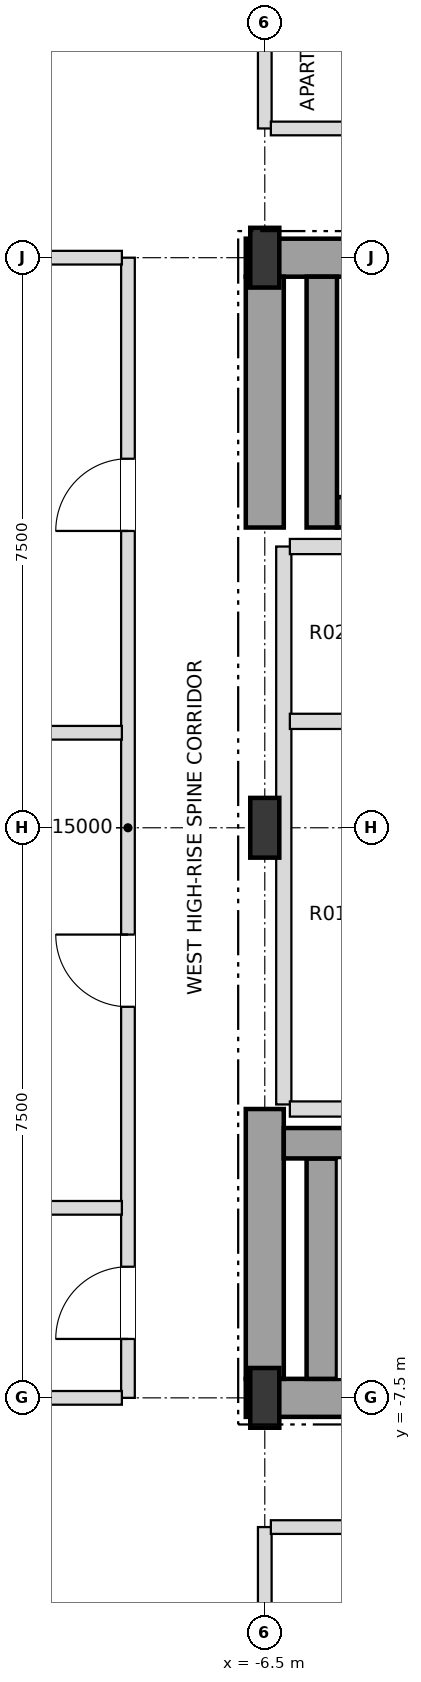
"""IFC4 building model, lengths in metres.
Left out: names, types, materials, properties, quantities, classifications, styles, units other than length and angle.
Written with IfcOpenShell. Run it as: python <this file> out.ifc"""

import sys

from ifc_helpers import new_model, si_unit, direction, frame, frame_2d, origin, origin_2d, place, context, subcontext, project, spatial, rectangle, i_section, extrude, element, fill, save


model = new_model("IFC4")
c1 = context("Model", 3, precision=1e-05, world=origin(), true_north=direction((0.0, 1.0)))
c2 = subcontext(c1, "Body", "Model", "MODEL_VIEW")
j1 = project(units=[si_unit("LENGTHUNIT", "METRE"), si_unit("PLANEANGLEUNIT", "RADIAN")], contexts=[c1])
p1 = place(None, origin())
s1 = spatial("IfcSite", under=j1, at=p1, CompositionType="ELEMENT")
p2 = place(p1, origin())
s2 = spatial("IfcBuilding", under=s1, at=p2, CompositionType="ELEMENT")
p3 = place(p2, frame((0.0, 0.0, 276.3)))
s3 = spatial("IfcBuildingStorey", under=s2, at=p3, CompositionType="ELEMENT", Elevation=276.3)
for number, where, z_axis, x_axis in (
    (1, (-6.5, -7.5, 0.0), (0.0, 0.0, 1.0), (1.0, 0.0, 0.0)),
    (2, (-6.5, 0.0, 0.0), (0.0, 0.0, 1.0), (1.0, 0.0, 0.0)),
    (3, (-6.5, 7.5, 0.0), (0.0, 0.0, 1.0), (1.0, 0.0, 0.0)),
):
    element("IfcColumn", number, at=place(p3, frame(where, z_axis=z_axis, x_axis=x_axis)), inside=s3, PredefinedType="COLUMN", context=c2, shape_type="SweptSolid", body=[
        extrude(i_section(OverallWidth=0.382, OverallDepth=0.786, WebThickness=0.02, FlangeThickness=0.033, at=origin_2d()), origin(), (0.0, 0.0, 1.0), 3.6),
    ])
p4 = place(p3, frame((-6.75, -7.5, 0.0), z_axis=(0.0, 0.0, 1.0), x_axis=(1.0, 0.0, 0.0)))
e4 = element("IfcWall", 4, at=p4, inside=s3, PredefinedType="SHEAR", context=c2, shape_type="SweptSolid", body=[
    extrude(rectangle(XDim=6.75, YDim=0.5, at=frame_2d((3.375, 0.0))), origin(), (0.0, 0.0, 1.0), 3.38),
])
p5 = place(p3, frame((-6.75, 7.5, 0.0), z_axis=(0.0, 0.0, 1.0), x_axis=(1.0, 0.0, 0.0)))
e5 = element("IfcWall", 5, at=p5, inside=s3, PredefinedType="SHEAR", context=c2, shape_type="SweptSolid", body=[
    extrude(rectangle(XDim=6.75, YDim=0.5, at=frame_2d((3.375, 0.0))), origin(), (0.0, 0.0, 1.0), 3.38),
])
p6 = place(p5, frame((1.65, 0.0, 0.0)))
e6 = element("IfcOpeningElement", 6, at=p6, cuts=e5, PredefinedType="OPENING", context=c2, shape_type="SweptSolid", body=[
    extrude(rectangle(XDim=1.05, YDim=2.15, at=frame_2d((0.525, 1.075))), frame((0.0, 0.26, 0.0), z_axis=(0.0, -1.0, 0.0), x_axis=(1.0, 0.0, 0.0)), (0.0, 0.0, 1.0), 0.52),
])
p7 = place(p3, frame((-6.5, -7.25, 0.0), z_axis=(0.0, 0.0, 1.0), x_axis=(0.0, 1.0, 0.0)))
e7 = element("IfcWall", 7, at=p7, inside=s3, PredefinedType="SHEAR", context=c2, shape_type="SweptSolid", body=[
    extrude(rectangle(XDim=3.55, YDim=0.5, at=frame_2d((1.775, 0.0))), origin(), (0.0, 0.0, 1.0), 3.38),
])
p8 = place(p3, frame((-6.5, 3.95, 0.0), z_axis=(0.0, 0.0, 1.0), x_axis=(0.0, 1.0, 0.0)))
e8 = element("IfcWall", 8, at=p8, inside=s3, PredefinedType="SHEAR", context=c2, shape_type="SweptSolid", body=[
    extrude(rectangle(XDim=3.3, YDim=0.5, at=frame_2d((1.65, 0.0))), origin(), (0.0, 0.0, 1.0), 3.38),
])
p9 = place(p3, frame((-5.75, -7.25, 0.0), z_axis=(0.0, 0.0, 1.0), x_axis=(0.0, 1.0, 0.0)))
e9 = element("IfcWall", 9, at=p9, inside=s3, PredefinedType="SHEAR", context=c2, shape_type="SweptSolid", body=[
    extrude(rectangle(XDim=2.9, YDim=0.4, at=frame_2d((1.45, 0.0))), origin(), (0.0, 0.0, 1.0), 3.38),
])
p10 = place(p3, frame((-6.25, -4.15, 0.0), z_axis=(0.0, 0.0, 1.0), x_axis=(1.0, 0.0, 0.0)))
e10 = element("IfcWall", 10, at=p10, inside=s3, PredefinedType="SHEAR", context=c2, shape_type="SweptSolid", body=[
    extrude(rectangle(XDim=7.78, YDim=0.4, at=frame_2d((3.89, 0.0))), origin(), (0.0, 0.0, 1.0), 3.38),
])
p11 = place(p3, frame((-5.55, 4.15, 0.0), z_axis=(0.0, 0.0, 1.0), x_axis=(1.0, 0.0, 0.0)))
e11 = element("IfcWall", 11, at=p11, inside=s3, PredefinedType="SHEAR", context=c2, shape_type="SweptSolid", body=[
    extrude(rectangle(XDim=7.08, YDim=0.4, at=frame_2d((3.54, 0.0))), origin(), (0.0, 0.0, 1.0), 3.38),
])
p12 = place(p3, frame((-5.75, 3.95, 0.0), z_axis=(0.0, 0.0, 1.0), x_axis=(0.0, 1.0, 0.0)))
e12 = element("IfcWall", 12, at=p12, inside=s3, PredefinedType="SHEAR", context=c2, shape_type="SweptSolid", body=[
    extrude(rectangle(XDim=3.3, YDim=0.4, at=frame_2d((1.65, 0.0))), origin(), (0.0, 0.0, 1.0), 3.38),
])
p13 = place(p3, frame((-8.3, -7.5, 0.0), z_axis=(0.0, 0.0, 1.0), x_axis=(0.0, 1.0, 0.0)))
e13 = element("IfcWall", 13, at=p13, inside=s3, PredefinedType="PARTITIONING", context=c2, shape_type="SweptSolid", body=[
    extrude(rectangle(XDim=15.0, YDim=0.18, at=frame_2d((7.5, 0.0))), origin(), (0.0, 0.0, 1.0), 3.38),
])
p14 = place(p13, frame((0.775, 0.0, 0.0)))
e14 = element("IfcOpeningElement", 14, at=p14, cuts=e13, PredefinedType="OPENING", context=c2, shape_type="SweptSolid", body=[
    extrude(rectangle(XDim=0.95, YDim=2.15, at=frame_2d((0.475, 1.075))), frame((0.0, 0.1, 0.0), z_axis=(0.0, -1.0, 0.0), x_axis=(1.0, 0.0, 0.0)), (0.0, 0.0, 1.0), 0.2),
])
p15 = place(p13, frame((5.145, 0.0, 0.0)))
e15 = element("IfcOpeningElement", 15, at=p15, cuts=e13, PredefinedType="OPENING", context=c2, shape_type="SweptSolid", body=[
    extrude(rectangle(XDim=0.95, YDim=2.15, at=frame_2d((0.475, 1.075))), frame((0.0, 0.1, 0.0), z_axis=(0.0, -1.0, 0.0), x_axis=(1.0, 0.0, 0.0)), (0.0, 0.0, 1.0), 0.2),
])
p16 = place(p13, frame((11.405, 0.0, 0.0)))
e16 = element("IfcOpeningElement", 16, at=p16, cuts=e13, PredefinedType="OPENING", context=c2, shape_type="SweptSolid", body=[
    extrude(rectangle(XDim=0.95, YDim=2.15, at=frame_2d((0.475, 1.075))), frame((0.0, 0.1, 0.0), z_axis=(0.0, -1.0, 0.0), x_axis=(1.0, 0.0, 0.0)), (0.0, 0.0, 1.0), 0.2),
])
for number, where, z_axis, x_axis in (
    (17, (-6.5, -19.9, 0.0), (0.0, 0.0, 1.0), (0.0, 1.0, 0.0)),
    (18, (-6.5, 9.2, 0.0), (0.0, 0.0, 1.0), (0.0, 1.0, 0.0)),
):
    element("IfcWall", number, at=place(p3, frame(where, z_axis=z_axis, x_axis=x_axis)), inside=s3, PredefinedType="PARTITIONING", context=c2, shape_type="SweptSolid", body=[
        extrude(rectangle(XDim=10.7, YDim=0.18, at=frame_2d((5.35, 0.0))), origin(), (0.0, 0.0, 1.0), 2.826),
    ])
p17 = place(p3, frame((-6.25, -3.64, 0.0), z_axis=(0.0, 0.0, 1.0), x_axis=(0.0, 1.0, 0.0)))
e19 = element("IfcWall", 19, at=p17, inside=s3, PredefinedType="SOLIDWALL", context=c2, shape_type="SweptSolid", body=[
    extrude(rectangle(XDim=7.34, YDim=0.2, at=frame_2d((3.67, 0.0))), origin(), (0.0, 0.0, 1.0), 3.38),
])
p18 = place(p3, frame((-6.42, -9.2, 0.0), z_axis=(0.0, 0.0, 1.0), x_axis=(1.0, 0.0, 0.0)))
e20 = element("IfcWall", 20, at=p18, inside=s3, PredefinedType="PARTITIONING", context=c2, shape_type="SweptSolid", body=[
    extrude(rectangle(XDim=5.94, YDim=0.18, at=frame_2d((2.97, 0.0))), origin(), (0.0, 0.0, 1.0), 3.38),
])
p19 = place(p18, frame((2.485, 0.0, 0.0)))
e21 = element("IfcOpeningElement", 21, at=p19, cuts=e20, PredefinedType="OPENING", context=c2, shape_type="SweptSolid", body=[
    extrude(rectangle(XDim=0.95, YDim=2.15, at=frame_2d((0.475, 1.075))), frame((0.0, 0.1, 0.0), z_axis=(0.0, -1.0, 0.0), x_axis=(1.0, 0.0, 0.0)), (0.0, 0.0, 1.0), 0.2),
])
p20 = place(p3, frame((-16.9, -7.5, 0.0), z_axis=(0.0, 0.0, 1.0), x_axis=(1.0, 0.0, 0.0)))
e22 = element("IfcWall", 22, at=p20, inside=s3, PredefinedType="PARTITIONING", context=c2, shape_type="SweptSolid", body=[
    extrude(rectangle(XDim=8.52, YDim=0.18, at=frame_2d((4.26, 0.0))), origin(), (0.0, 0.0, 1.0), 2.826),
])
p21 = place(p3, frame((-16.82, -5.0, 0.0), z_axis=(0.0, 0.0, 1.0), x_axis=(1.0, 0.0, 0.0)))
e23 = element("IfcWall", 23, at=p21, inside=s3, PredefinedType="PARTITIONING", context=c2, shape_type="SweptSolid", body=[
    extrude(rectangle(XDim=8.44, YDim=0.18, at=frame_2d((4.22, 0.0))), origin(), (0.0, 0.0, 1.0), 3.018),
])
p22 = place(p3, frame((-6.17, -3.7, 0.0), z_axis=(0.0, 0.0, 1.0), x_axis=(1.0, 0.0, 0.0)))
e24 = element("IfcWall", 24, at=p22, inside=s3, PredefinedType="SOLIDWALL", context=c2, shape_type="SweptSolid", body=[
    extrude(rectangle(XDim=1.94, YDim=0.2, at=frame_2d((0.97, 0.0))), origin(), (0.0, 0.0, 1.0), 3.38),
])
p23 = place(p3, frame((-16.82, 1.25, 0.0), z_axis=(0.0, 0.0, 1.0), x_axis=(1.0, 0.0, 0.0)))
e25 = element("IfcWall", 25, at=p23, inside=s3, PredefinedType="PARTITIONING", context=c2, shape_type="SweptSolid", body=[
    extrude(rectangle(XDim=8.44, YDim=0.18, at=frame_2d((4.22, 0.0))), origin(), (0.0, 0.0, 1.0), 3.018),
])
for number, where, z_axis, x_axis in (
    (26, (-6.17, 1.4, 0.0), (0.0, 0.0, 1.0), (1.0, 0.0, 0.0)),
    (27, (-6.17, 3.7, 0.0), (0.0, 0.0, 1.0), (1.0, 0.0, 0.0)),
):
    element("IfcWall", number, at=place(p3, frame(where, z_axis=z_axis, x_axis=x_axis)), inside=s3, PredefinedType="SOLIDWALL", context=c2, shape_type="SweptSolid", body=[
        extrude(rectangle(XDim=1.94, YDim=0.2, at=frame_2d((0.97, 0.0))), origin(), (0.0, 0.0, 1.0), 3.38),
    ])
p24 = place(p3, frame((-16.9, 7.5, 0.0), z_axis=(0.0, 0.0, 1.0), x_axis=(1.0, 0.0, 0.0)))
e28 = element("IfcWall", 28, at=p24, inside=s3, PredefinedType="PARTITIONING", context=c2, shape_type="SweptSolid", body=[
    extrude(rectangle(XDim=8.52, YDim=0.18, at=frame_2d((4.26, 0.0))), origin(), (0.0, 0.0, 1.0), 2.826),
])
p25 = place(p3, frame((-6.42, 9.2, 0.0), z_axis=(0.0, 0.0, 1.0), x_axis=(1.0, 0.0, 0.0)))
e29 = element("IfcWall", 29, at=p25, inside=s3, PredefinedType="PARTITIONING", context=c2, shape_type="SweptSolid", body=[
    extrude(rectangle(XDim=1.79, YDim=0.18, at=frame_2d((0.895, 0.0))), origin(), (0.0, 0.0, 1.0), 3.38),
])
p26 = place(p14, origin())
e30 = element("IfcDoor", 30, at=p26, inside=s3, OperationType="SINGLE_SWING_LEFT", PredefinedType="DOOR", context=c2, shape_type="SweptSolid", body=[
    extrude(rectangle(XDim=0.95, YDim=2.15, at=frame_2d((0.475, 1.075))), frame((0.0, 0.025, 0.0), z_axis=(0.0, -1.0, 0.0), x_axis=(1.0, 0.0, 0.0)), (0.0, 0.0, 1.0), 0.05),
])
fill(e14, e30)
p27 = place(p15, origin())
e31 = element("IfcDoor", 31, at=p27, inside=s3, OperationType="SINGLE_SWING_RIGHT", PredefinedType="DOOR", context=c2, shape_type="SweptSolid", body=[
    extrude(rectangle(XDim=0.95, YDim=2.15, at=frame_2d((0.475, 1.075))), frame((0.0, 0.025, 0.0), z_axis=(0.0, -1.0, 0.0), x_axis=(1.0, 0.0, 0.0)), (0.0, 0.0, 1.0), 0.05),
])
fill(e15, e31)
p28 = place(p16, origin())
e32 = element("IfcDoor", 32, at=p28, inside=s3, OperationType="SINGLE_SWING_LEFT", PredefinedType="DOOR", context=c2, shape_type="SweptSolid", body=[
    extrude(rectangle(XDim=0.95, YDim=2.15, at=frame_2d((0.475, 1.075))), frame((0.0, 0.025, 0.0), z_axis=(0.0, -1.0, 0.0), x_axis=(1.0, 0.0, 0.0)), (0.0, 0.0, 1.0), 0.05),
])
fill(e16, e32)
save(model, sys.argv[1])
